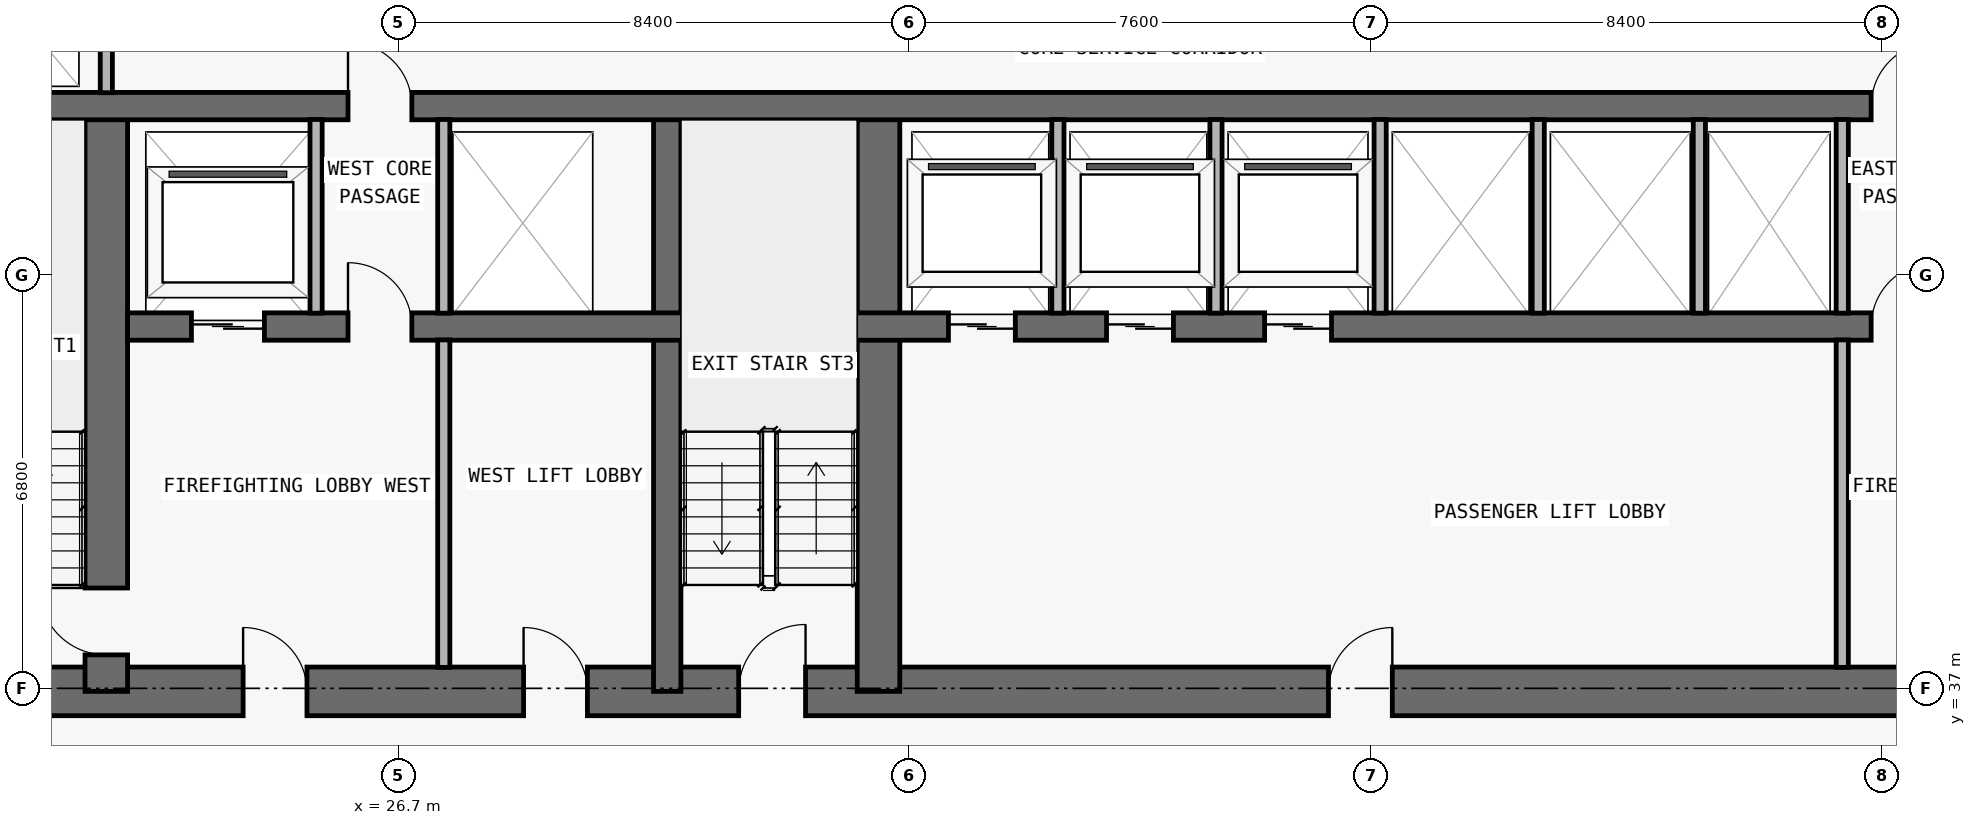
"""IFC4 building model, lengths in metres.
Left out: names, types, materials, properties, quantities, classifications, styles, units other than length and angle.
Written with IfcOpenShell. Run it as: python <this file> out.ifc"""

import sys

from ifc_helpers import new_model, si_unit, direction, frame, frame_2d, origin, place, context, subcontext, project, spatial, rectangle, extrude, element, fill, save


model = new_model("IFC4")
c1 = context("Model", 3, precision=1e-05, world=origin(), true_north=direction((0.0, 1.0)))
c2 = subcontext(c1, "Body", "Model", "MODEL_VIEW")
j1 = project(units=[si_unit("LENGTHUNIT", "METRE"), si_unit("PLANEANGLEUNIT", "RADIAN")], contexts=[c1])
p1 = place(None, origin())
s1 = spatial("IfcSite", under=j1, at=p1, CompositionType="ELEMENT")
p2 = place(p1, origin())
s2 = spatial("IfcBuilding", under=s1, at=p2, CompositionType="ELEMENT")
p3 = place(p2, frame((0.0, 0.0, 87.9)))
s3 = spatial("IfcBuildingStorey", under=s2, at=p3, CompositionType="ELEMENT", Elevation=87.9)
p4 = place(p3, frame((17.85, 36.95, 0.0), z_axis=(0.0, 0.0, 1.0), x_axis=(1.0, 0.0, 0.0)))
e1 = element("IfcWall", 1, at=p4, inside=s3, PredefinedType="SHEAR", context=c2, shape_type="SweptSolid", body=[
    extrude(rectangle(XDim=42.1, YDim=0.8, at=frame_2d((21.05, 0.0))), origin(), (0.0, 0.0, 1.0), 3.05),
])
p5 = place(p4, frame((14.45, 0.0, 0.0)))
e2 = element("IfcOpeningElement", 2, at=p5, cuts=e1, PredefinedType="OPENING", context=c2, shape_type="SweptSolid", body=[
    extrude(rectangle(XDim=1.1, YDim=2.15, at=frame_2d((0.55, 1.075))), frame((0.0, 0.41, 0.0), z_axis=(0.0, -1.0, 0.0), x_axis=(1.0, 0.0, 0.0)), (0.0, 0.0, 1.0), 0.82),
])
p6 = place(p4, frame((6.3, 0.0, 0.0)))
e3 = element("IfcOpeningElement", 3, at=p6, cuts=e1, PredefinedType="OPENING", context=c2, shape_type="SweptSolid", body=[
    extrude(rectangle(XDim=1.05, YDim=2.15, at=frame_2d((0.525, 1.075))), frame((0.0, 0.41, 0.0), z_axis=(0.0, -1.0, 0.0), x_axis=(1.0, 0.0, 0.0)), (0.0, 0.0, 1.0), 0.82),
])
p7 = place(p4, frame((34.8, 0.0, 0.0)))
e4 = element("IfcOpeningElement", 4, at=p7, cuts=e1, PredefinedType="OPENING", context=c2, shape_type="SweptSolid", body=[
    extrude(rectangle(XDim=1.05, YDim=2.15, at=frame_2d((0.525, 1.075))), frame((0.0, 0.41, 0.0), z_axis=(0.0, -1.0, 0.0), x_axis=(1.0, 0.0, 0.0)), (0.0, 0.0, 1.0), 0.82),
])
p8 = place(p4, frame((10.913, 0.0, 0.0)))
e5 = element("IfcOpeningElement", 5, at=p8, cuts=e1, PredefinedType="OPENING", context=c2, shape_type="SweptSolid", body=[
    extrude(rectangle(XDim=1.05, YDim=2.15, at=frame_2d((0.525, 1.075))), frame((0.0, 0.41, 0.0), z_axis=(0.0, -1.0, 0.0), x_axis=(1.0, 0.0, 0.0)), (0.0, 0.0, 1.0), 0.82),
])
p9 = place(p4, frame((24.15, 0.0, 0.0)))
e6 = element("IfcOpeningElement", 6, at=p9, cuts=e1, PredefinedType="OPENING", context=c2, shape_type="SweptSolid", body=[
    extrude(rectangle(XDim=1.05, YDim=2.15, at=frame_2d((0.525, 1.075))), frame((0.0, 0.41, 0.0), z_axis=(0.0, -1.0, 0.0), x_axis=(1.0, 0.0, 0.0)), (0.0, 0.0, 1.0), 0.82),
])
p10 = place(p3, frame((21.9, 36.95, 0.0), z_axis=(0.0, 0.0, 1.0), x_axis=(0.0, 1.0, 0.0)))
e7 = element("IfcWall", 7, at=p10, inside=s3, PredefinedType="SHEAR", context=c2, shape_type="SweptSolid", body=[
    extrude(rectangle(XDim=9.625, YDim=0.7, at=frame_2d((4.812, 0.0))), origin(), (0.0, 0.0, 1.0), 3.05),
])
p11 = place(p10, frame((0.6, 0.0, 0.0)))
e8 = element("IfcOpeningElement", 8, at=p11, cuts=e7, PredefinedType="OPENING", context=c2, shape_type="SweptSolid", body=[
    extrude(rectangle(XDim=1.1, YDim=2.15, at=frame_2d((0.55, 1.075))), frame((0.0, 0.36, 0.0), z_axis=(0.0, -1.0, 0.0), x_axis=(1.0, 0.0, 0.0)), (0.0, 0.0, 1.0), 0.72),
])
p12 = place(p3, frame((31.125, 36.95, 0.0), z_axis=(0.0, 0.0, 1.0), x_axis=(0.0, 1.0, 0.0)))
e9 = element("IfcWall", 9, at=p12, inside=s3, PredefinedType="SHEAR", context=c2, shape_type="SweptSolid", body=[
    extrude(rectangle(XDim=9.625, YDim=0.45, at=frame_2d((4.812, 0.0))), origin(), (0.0, 0.0, 1.0), 3.05),
])
p13 = place(p3, frame((34.6, 36.95, 0.0), z_axis=(0.0, 0.0, 1.0), x_axis=(0.0, 1.0, 0.0)))
e10 = element("IfcWall", 10, at=p13, inside=s3, PredefinedType="SHEAR", context=c2, shape_type="SweptSolid", body=[
    extrude(rectangle(XDim=9.625, YDim=0.7, at=frame_2d((4.812, 0.0))), origin(), (0.0, 0.0, 1.0), 3.05),
])
p14 = place(p3, frame((22.25, 42.95, 0.0), z_axis=(0.0, 0.0, 1.0), x_axis=(1.0, 0.0, 0.0)))
e11 = element("IfcWall", 11, at=p14, inside=s3, PredefinedType="SHEAR", context=c2, shape_type="SweptSolid", body=[
    extrude(rectangle(XDim=33.3, YDim=0.45, at=frame_2d((16.65, 0.0))), origin(), (0.0, 0.0, 1.0), 3.05),
])
p15 = place(p14, frame((1.05, 0.0, 0.0)))
e12 = element("IfcOpeningElement", 12, at=p15, cuts=e11, PredefinedType="OPENING", context=c2, shape_type="SweptSolid", body=[
    extrude(rectangle(XDim=1.2, YDim=2.2, at=frame_2d((0.6, 1.1))), frame((0.0, 0.235, 0.0), z_axis=(0.0, -1.0, 0.0), x_axis=(1.0, 0.0, 0.0)), (0.0, 0.0, 1.0), 0.47),
])
p16 = place(p14, frame((31.05, 0.0, 0.0)))
e13 = element("IfcOpeningElement", 13, at=p16, cuts=e11, PredefinedType="OPENING", context=c2, shape_type="SweptSolid", body=[
    extrude(rectangle(XDim=1.2, YDim=2.2, at=frame_2d((0.6, 1.1))), frame((0.0, 0.235, 0.0), z_axis=(0.0, -1.0, 0.0), x_axis=(1.0, 0.0, 0.0)), (0.0, 0.0, 1.0), 0.47),
])
p17 = place(p14, frame((13.5, 0.0, 0.0)))
e14 = element("IfcOpeningElement", 14, at=p17, cuts=e11, PredefinedType="OPENING", context=c2, shape_type="SweptSolid", body=[
    extrude(rectangle(XDim=1.1, YDim=2.2, at=frame_2d((0.55, 1.1))), frame((0.0, 0.235, 0.0), z_axis=(0.0, -1.0, 0.0), x_axis=(1.0, 0.0, 0.0)), (0.0, 0.0, 1.0), 0.47),
])
p18 = place(p14, frame((16.1, 0.0, 0.0)))
e15 = element("IfcOpeningElement", 15, at=p18, cuts=e11, PredefinedType="OPENING", context=c2, shape_type="SweptSolid", body=[
    extrude(rectangle(XDim=1.1, YDim=2.2, at=frame_2d((0.55, 1.1))), frame((0.0, 0.235, 0.0), z_axis=(0.0, -1.0, 0.0), x_axis=(1.0, 0.0, 0.0)), (0.0, 0.0, 1.0), 0.47),
])
p19 = place(p14, frame((18.7, 0.0, 0.0)))
e16 = element("IfcOpeningElement", 16, at=p19, cuts=e11, PredefinedType="OPENING", context=c2, shape_type="SweptSolid", body=[
    extrude(rectangle(XDim=1.1, YDim=2.2, at=frame_2d((0.55, 1.1))), frame((0.0, 0.235, 0.0), z_axis=(0.0, -1.0, 0.0), x_axis=(1.0, 0.0, 0.0)), (0.0, 0.0, 1.0), 0.47),
])
p20 = place(p14, frame((3.625, 0.0, 0.0)))
e17 = element("IfcOpeningElement", 17, at=p20, cuts=e11, PredefinedType="OPENING", context=c2, shape_type="SweptSolid", body=[
    extrude(rectangle(XDim=1.05, YDim=2.15, at=frame_2d((0.525, 1.075))), frame((0.0, 0.235, 0.0), z_axis=(0.0, -1.0, 0.0), x_axis=(1.0, 0.0, 0.0)), (0.0, 0.0, 1.0), 0.47),
])
p21 = place(p14, frame((28.675, 0.0, 0.0)))
e18 = element("IfcOpeningElement", 18, at=p21, cuts=e11, PredefinedType="OPENING", context=c2, shape_type="SweptSolid", body=[
    extrude(rectangle(XDim=1.05, YDim=2.15, at=frame_2d((0.525, 1.075))), frame((0.0, 0.235, 0.0), z_axis=(0.0, -1.0, 0.0), x_axis=(1.0, 0.0, 0.0)), (0.0, 0.0, 1.0), 0.47),
])
p22 = place(p3, frame((18.25, 46.575, 0.0), z_axis=(0.0, 0.0, 1.0), x_axis=(1.0, 0.0, 0.0)))
e19 = element("IfcWall", 19, at=p22, inside=s3, PredefinedType="SHEAR", context=c2, shape_type="SweptSolid", body=[
    extrude(rectangle(XDim=41.3, YDim=0.45, at=frame_2d((20.65, 0.0))), origin(), (0.0, 0.0, 1.0), 3.05),
])
p23 = place(p22, frame((7.625, 0.0, 0.0)))
e20 = element("IfcOpeningElement", 20, at=p23, cuts=e19, PredefinedType="OPENING", context=c2, shape_type="SweptSolid", body=[
    extrude(rectangle(XDim=1.05, YDim=2.15, at=frame_2d((0.525, 1.075))), frame((0.0, 0.235, 0.0), z_axis=(0.0, -1.0, 0.0), x_axis=(1.0, 0.0, 0.0)), (0.0, 0.0, 1.0), 0.47),
])
p24 = place(p22, frame((32.675, 0.0, 0.0)))
e21 = element("IfcOpeningElement", 21, at=p24, cuts=e19, PredefinedType="OPENING", context=c2, shape_type="SweptSolid", body=[
    extrude(rectangle(XDim=1.05, YDim=2.15, at=frame_2d((0.525, 1.075))), frame((0.0, 0.235, 0.0), z_axis=(0.0, -1.0, 0.0), x_axis=(1.0, 0.0, 0.0)), (0.0, 0.0, 1.0), 0.47),
])
p25 = place(p3, frame((21.9, 46.795, 0.0), z_axis=(0.0, 0.0, 1.0), x_axis=(0.0, 1.0, 0.0)))
e22 = element("IfcWall", 22, at=p25, inside=s3, PredefinedType="PARTITIONING", context=c2, shape_type="SweptSolid", body=[
    extrude(rectangle(XDim=3.06, YDim=0.2, at=frame_2d((1.53, 0.0))), origin(), (0.0, 0.0, 1.0), 3.05),
])
p26 = place(p3, frame((25.35, 43.17, 0.0), z_axis=(0.0, 0.0, 1.0), x_axis=(0.0, 1.0, 0.0)))
e23 = element("IfcWall", 23, at=p26, inside=s3, PredefinedType="PARTITIONING", context=c2, shape_type="SweptSolid", body=[
    extrude(rectangle(XDim=3.185, YDim=0.2, at=frame_2d((1.593, 0.0))), origin(), (0.0, 0.0, 1.0), 3.05),
])
p27 = place(p3, frame((27.45, 37.345, 0.0), z_axis=(0.0, 0.0, 1.0), x_axis=(0.0, 1.0, 0.0)))
e24 = element("IfcWall", 24, at=p27, inside=s3, PredefinedType="PARTITIONING", context=c2, shape_type="SweptSolid", body=[
    extrude(rectangle(XDim=5.385, YDim=0.2, at=frame_2d((2.692, 0.0))), origin(), (0.0, 0.0, 1.0), 3.05),
])
for number, where, z_axis, x_axis in (
    (25, (27.45, 43.17, 0.0), (0.0, 0.0, 1.0), (0.0, 1.0, 0.0)),
    (26, (37.55, 43.17, 0.0), (0.0, 0.0, 1.0), (0.0, 1.0, 0.0)),
    (27, (40.15, 43.17, 0.0), (0.0, 0.0, 1.0), (0.0, 1.0, 0.0)),
    (28, (42.85, 43.17, 0.0), (0.0, 0.0, 1.0), (0.0, 1.0, 0.0)),
    (29, (45.45, 43.17, 0.0), (0.0, 0.0, 1.0), (0.0, 1.0, 0.0)),
    (30, (48.1, 43.17, 0.0), (0.0, 0.0, 1.0), (0.0, 1.0, 0.0)),
):
    element("IfcWall", number, at=place(p3, frame(where, z_axis=z_axis, x_axis=x_axis)), inside=s3, PredefinedType="PARTITIONING", context=c2, shape_type="SweptSolid", body=[
        extrude(rectangle(XDim=3.185, YDim=0.2, at=frame_2d((1.593, 0.0))), origin(), (0.0, 0.0, 1.0), 3.05),
    ])
p28 = place(p3, frame((50.45, 37.345, 0.0), z_axis=(0.0, 0.0, 1.0), x_axis=(0.0, 1.0, 0.0)))
e31 = element("IfcWall", 31, at=p28, inside=s3, PredefinedType="PARTITIONING", context=c2, shape_type="SweptSolid", body=[
    extrude(rectangle(XDim=5.385, YDim=0.2, at=frame_2d((2.692, 0.0))), origin(), (0.0, 0.0, 1.0), 3.05),
])
p29 = place(p3, frame((50.45, 43.17, 0.0), z_axis=(0.0, 0.0, 1.0), x_axis=(0.0, 1.0, 0.0)))
e32 = element("IfcWall", 32, at=p29, inside=s3, PredefinedType="PARTITIONING", context=c2, shape_type="SweptSolid", body=[
    extrude(rectangle(XDim=3.185, YDim=0.2, at=frame_2d((1.593, 0.0))), origin(), (0.0, 0.0, 1.0), 3.05),
])
p30 = place(p15, origin())
e33 = element("IfcDoor", 33, at=p30, inside=s3, OperationType="DOUBLE_DOOR_SLIDING", PredefinedType="DOOR", context=c2, shape_type="SweptSolid", body=[
    extrude(rectangle(XDim=1.2, YDim=2.2, at=frame_2d((0.6, 1.1))), frame((0.0, 0.025, 0.0), z_axis=(0.0, -1.0, 0.0), x_axis=(1.0, 0.0, 0.0)), (0.0, 0.0, 1.0), 0.05),
])
fill(e12, e33)
p31 = place(p17, origin())
e34 = element("IfcDoor", 34, at=p31, inside=s3, OperationType="DOUBLE_DOOR_SLIDING", PredefinedType="DOOR", context=c2, shape_type="SweptSolid", body=[
    extrude(rectangle(XDim=1.1, YDim=2.2, at=frame_2d((0.55, 1.1))), frame((0.0, 0.025, 0.0), z_axis=(0.0, -1.0, 0.0), x_axis=(1.0, 0.0, 0.0)), (0.0, 0.0, 1.0), 0.05),
])
fill(e14, e34)
p32 = place(p18, origin())
e35 = element("IfcDoor", 35, at=p32, inside=s3, OperationType="DOUBLE_DOOR_SLIDING", PredefinedType="DOOR", context=c2, shape_type="SweptSolid", body=[
    extrude(rectangle(XDim=1.1, YDim=2.2, at=frame_2d((0.55, 1.1))), frame((0.0, 0.025, 0.0), z_axis=(0.0, -1.0, 0.0), x_axis=(1.0, 0.0, 0.0)), (0.0, 0.0, 1.0), 0.05),
])
fill(e15, e35)
p33 = place(p19, origin())
e36 = element("IfcDoor", 36, at=p33, inside=s3, OperationType="DOUBLE_DOOR_SLIDING", PredefinedType="DOOR", context=c2, shape_type="SweptSolid", body=[
    extrude(rectangle(XDim=1.1, YDim=2.2, at=frame_2d((0.55, 1.1))), frame((0.0, 0.025, 0.0), z_axis=(0.0, -1.0, 0.0), x_axis=(1.0, 0.0, 0.0)), (0.0, 0.0, 1.0), 0.05),
])
fill(e16, e36)
p34 = place(p5, origin())
e37 = element("IfcDoor", 37, at=p34, inside=s3, OperationType="SINGLE_SWING_RIGHT", PredefinedType="DOOR", context=c2, shape_type="SweptSolid", body=[
    extrude(rectangle(XDim=1.1, YDim=2.15, at=frame_2d((0.55, 1.075))), frame((0.0, 0.025, 0.0), z_axis=(0.0, -1.0, 0.0), x_axis=(1.0, 0.0, 0.0)), (0.0, 0.0, 1.0), 0.05),
])
fill(e2, e37)
p35 = place(p6, origin())
e38 = element("IfcDoor", 38, at=p35, inside=s3, OperationType="SINGLE_SWING_LEFT", PredefinedType="DOOR", context=c2, shape_type="SweptSolid", body=[
    extrude(rectangle(XDim=1.05, YDim=2.15, at=frame_2d((0.525, 1.075))), frame((0.0, 0.025, 0.0), z_axis=(0.0, -1.0, 0.0), x_axis=(1.0, 0.0, 0.0)), (0.0, 0.0, 1.0), 0.05),
])
fill(e3, e38)
p36 = place(p11, origin())
e39 = element("IfcDoor", 39, at=p36, inside=s3, OperationType="SINGLE_SWING_RIGHT", PredefinedType="DOOR", context=c2, shape_type="SweptSolid", body=[
    extrude(rectangle(XDim=1.1, YDim=2.15, at=frame_2d((0.55, 1.075))), frame((0.0, 0.025, 0.0), z_axis=(0.0, -1.0, 0.0), x_axis=(1.0, 0.0, 0.0)), (0.0, 0.0, 1.0), 0.05),
])
fill(e8, e39)
p37 = place(p20, origin())
e40 = element("IfcDoor", 40, at=p37, inside=s3, OperationType="SINGLE_SWING_LEFT", PredefinedType="DOOR", context=c2, shape_type="SweptSolid", body=[
    extrude(rectangle(XDim=1.05, YDim=2.15, at=frame_2d((0.525, 1.075))), frame((0.0, 0.025, 0.0), z_axis=(0.0, -1.0, 0.0), x_axis=(1.0, 0.0, 0.0)), (0.0, 0.0, 1.0), 0.05),
])
fill(e17, e40)
p38 = place(p21, origin())
e41 = element("IfcDoor", 41, at=p38, inside=s3, OperationType="SINGLE_SWING_RIGHT", PredefinedType="DOOR", context=c2, shape_type="SweptSolid", body=[
    extrude(rectangle(XDim=1.05, YDim=2.15, at=frame_2d((0.525, 1.075))), frame((0.0, 0.025, 0.0), z_axis=(0.0, -1.0, 0.0), x_axis=(1.0, 0.0, 0.0)), (0.0, 0.0, 1.0), 0.05),
])
fill(e18, e41)
p39 = place(p8, origin())
e42 = element("IfcDoor", 42, at=p39, inside=s3, OperationType="SINGLE_SWING_LEFT", PredefinedType="DOOR", context=c2, shape_type="SweptSolid", body=[
    extrude(rectangle(XDim=1.05, YDim=2.15, at=frame_2d((0.525, 1.075))), frame((0.0, 0.025, 0.0), z_axis=(0.0, -1.0, 0.0), x_axis=(1.0, 0.0, 0.0)), (0.0, 0.0, 1.0), 0.05),
])
fill(e5, e42)
p40 = place(p9, origin())
e43 = element("IfcDoor", 43, at=p40, inside=s3, OperationType="SINGLE_SWING_RIGHT", PredefinedType="DOOR", context=c2, shape_type="SweptSolid", body=[
    extrude(rectangle(XDim=1.05, YDim=2.15, at=frame_2d((0.525, 1.075))), frame((0.0, 0.025, 0.0), z_axis=(0.0, -1.0, 0.0), x_axis=(1.0, 0.0, 0.0)), (0.0, 0.0, 1.0), 0.05),
])
fill(e6, e43)
p41 = place(p23, origin())
e44 = element("IfcDoor", 44, at=p41, inside=s3, OperationType="SINGLE_SWING_LEFT", PredefinedType="DOOR", context=c2, shape_type="SweptSolid", body=[
    extrude(rectangle(XDim=1.05, YDim=2.15, at=frame_2d((0.525, 1.075))), frame((0.0, 0.025, 0.0), z_axis=(0.0, -1.0, 0.0), x_axis=(1.0, 0.0, 0.0)), (0.0, 0.0, 1.0), 0.05),
])
fill(e20, e44)
p42 = place(p24, origin())
e45 = element("IfcDoor", 45, at=p42, inside=s3, OperationType="SINGLE_SWING_RIGHT", PredefinedType="DOOR", context=c2, shape_type="SweptSolid", body=[
    extrude(rectangle(XDim=1.05, YDim=2.15, at=frame_2d((0.525, 1.075))), frame((0.0, 0.025, 0.0), z_axis=(0.0, -1.0, 0.0), x_axis=(1.0, 0.0, 0.0)), (0.0, 0.0, 1.0), 0.05),
])
fill(e21, e45)
save(model, sys.argv[1])
